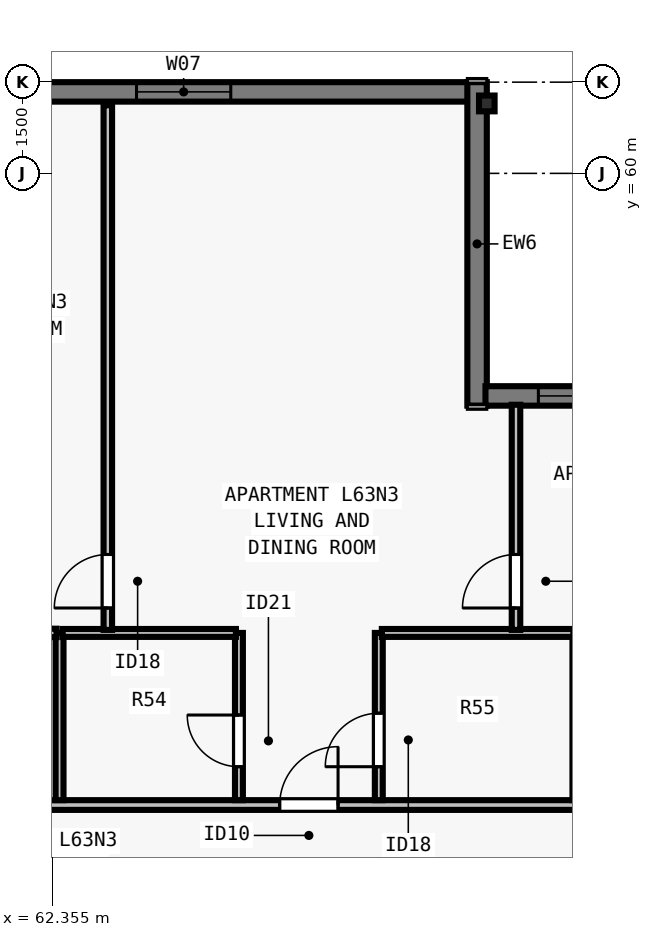
"""IFC4 building model, lengths in metres.
Left out: names, types, materials, properties, quantities, classifications, styles, units other than length and angle.
Written with IfcOpenShell. Run it as: python <this file> out.ifc"""

import sys

from ifc_helpers import new_model, si_unit, direction, frame, frame_2d, origin, origin_2d, place, context, subcontext, project, spatial, rectangle, i_section, extrude, element, fill, save


model = new_model("IFC4")
c1 = context("Model", 3, precision=1e-05, world=origin(), true_north=direction((0.0, 1.0)))
c2 = subcontext(c1, "Body", "Model", "MODEL_VIEW")
j1 = project(units=[si_unit("LENGTHUNIT", "METRE"), si_unit("PLANEANGLEUNIT", "RADIAN")], contexts=[c1])
p1 = place(None, origin())
s1 = spatial("IfcSite", under=j1, at=p1, CompositionType="ELEMENT")
p2 = place(p1, origin())
s2 = spatial("IfcBuilding", under=s1, at=p2, CompositionType="ELEMENT")
p3 = place(p2, frame((0.0, 0.0, 230.5)))
s3 = spatial("IfcBuildingStorey", under=s2, at=p3, CompositionType="ELEMENT", Elevation=230.5)
p4 = place(p3, frame((69.5, 61.15, 0.0), z_axis=(0.0, 0.0, 1.0), x_axis=(1.0, 0.0, 0.0)))
e1 = element("IfcColumn", 1, at=p4, inside=s3, PredefinedType="COLUMN", context=c2, shape_type="SweptSolid", body=[
    extrude(i_section(OverallWidth=0.256, OverallDepth=0.26, WebThickness=0.01, FlangeThickness=0.017, FilletRadius=0.013, at=origin_2d()), origin(), (0.0, 0.0, 1.0), 3.5),
])
p5 = place(p3, frame((34.5, 61.34, 0.0), z_axis=(0.0, 0.0, 1.0), x_axis=(1.0, 0.0, 0.0)))
e2 = element("IfcWall", 2, at=p5, inside=s3, PredefinedType="SOLIDWALL", context=c2, shape_type="SweptSolid", body=[
    extrude(rectangle(XDim=34.702, YDim=0.32, at=frame_2d((17.351, 0.0))), origin(), (0.0, 0.0, 1.0), 3.29),
])
p6 = place(p5, frame((4.163, 0.0, 0.8)))
e3 = element("IfcOpeningElement", 3, at=p6, cuts=e2, PredefinedType="OPENING", context=c2, shape_type="SweptSolid", body=[
    extrude(rectangle(XDim=1.85, YDim=1.678, at=frame_2d((0.925, 0.839))), frame((0.0, 0.17, 0.0), z_axis=(0.0, -1.0, 0.0), x_axis=(1.0, 0.0, 0.0)), (0.0, 0.0, 1.0), 0.34),
])
p7 = place(p5, frame((8.138, 0.0, 0.8)))
e4 = element("IfcOpeningElement", 4, at=p7, cuts=e2, PredefinedType="OPENING", context=c2, shape_type="SweptSolid", body=[
    extrude(rectangle(XDim=1.55, YDim=1.678, at=frame_2d((0.775, 0.839))), frame((0.0, 0.17, 0.0), z_axis=(0.0, -1.0, 0.0), x_axis=(1.0, 0.0, 0.0)), (0.0, 0.0, 1.0), 0.34),
])
p8 = place(p5, frame((15.338, 0.0, 0.8)))
e5 = element("IfcOpeningElement", 5, at=p8, cuts=e2, PredefinedType="OPENING", context=c2, shape_type="SweptSolid", body=[
    extrude(rectangle(XDim=1.55, YDim=1.678, at=frame_2d((0.775, 0.839))), frame((0.0, 0.17, 0.0), z_axis=(0.0, -1.0, 0.0), x_axis=(1.0, 0.0, 0.0)), (0.0, 0.0, 1.0), 0.34),
])
p9 = place(p5, frame((18.114, 0.0, 0.8)))
e6 = element("IfcOpeningElement", 6, at=p9, cuts=e2, PredefinedType="OPENING", context=c2, shape_type="SweptSolid", body=[
    extrude(rectangle(XDim=1.85, YDim=1.678, at=frame_2d((0.925, 0.839))), frame((0.0, 0.17, 0.0), z_axis=(0.0, -1.0, 0.0), x_axis=(1.0, 0.0, 0.0)), (0.0, 0.0, 1.0), 0.34),
])
p10 = place(p5, frame((25.314, 0.0, 0.8)))
e7 = element("IfcOpeningElement", 7, at=p10, cuts=e2, PredefinedType="OPENING", context=c2, shape_type="SweptSolid", body=[
    extrude(rectangle(XDim=1.85, YDim=1.678, at=frame_2d((0.925, 0.839))), frame((0.0, 0.17, 0.0), z_axis=(0.0, -1.0, 0.0), x_axis=(1.0, 0.0, 0.0)), (0.0, 0.0, 1.0), 0.34),
])
p11 = place(p5, frame((29.24, 0.0, 0.8)))
e8 = element("IfcOpeningElement", 8, at=p11, cuts=e2, PredefinedType="OPENING", context=c2, shape_type="SweptSolid", body=[
    extrude(rectangle(XDim=1.55, YDim=1.678, at=frame_2d((0.775, 0.839))), frame((0.0, 0.17, 0.0), z_axis=(0.0, -1.0, 0.0), x_axis=(1.0, 0.0, 0.0)), (0.0, 0.0, 1.0), 0.34),
])
p12 = place(p5, frame((10.95, 0.0, 0.8)))
e9 = element("IfcOpeningElement", 9, at=p12, cuts=e2, PredefinedType="OPENING", context=c2, shape_type="SweptSolid", body=[
    extrude(rectangle(XDim=0.9, YDim=1.678, at=frame_2d((0.45, 0.839))), frame((0.0, 0.17, 0.0), z_axis=(0.0, -1.0, 0.0), x_axis=(1.0, 0.0, 0.0)), (0.0, 0.0, 1.0), 0.34),
])
p13 = place(p5, frame((22.87, 0.0, 0.8)))
e10 = element("IfcOpeningElement", 10, at=p13, cuts=e2, PredefinedType="OPENING", context=c2, shape_type="SweptSolid", body=[
    extrude(rectangle(XDim=0.9, YDim=1.678, at=frame_2d((0.45, 0.839))), frame((0.0, 0.17, 0.0), z_axis=(0.0, -1.0, 0.0), x_axis=(1.0, 0.0, 0.0)), (0.0, 0.0, 1.0), 0.34),
])
p14 = place(p3, frame((69.34, 61.5, 0.0), z_axis=(0.0, 0.0, 1.0), x_axis=(0.0, -1.0, 0.0)))
e11 = element("IfcWall", 11, at=p14, inside=s3, PredefinedType="SOLIDWALL", context=c2, shape_type="SweptSolid", body=[
    extrude(rectangle(XDim=5.32, YDim=0.32, at=frame_2d((2.66, 0.0))), origin(), (0.0, 0.0, 1.0), 3.29),
])
p15 = place(p3, frame((69.478, 56.34, 0.0), z_axis=(0.0, 0.0, 1.0), x_axis=(1.0, 0.0, 0.0)))
e12 = element("IfcWall", 12, at=p15, inside=s3, PredefinedType="SOLIDWALL", context=c2, shape_type="SweptSolid", body=[
    extrude(rectangle(XDim=4.724, YDim=0.32, at=frame_2d((2.362, 0.0))), origin(), (0.0, 0.0, 1.0), 3.29),
])
p16 = place(p15, frame((0.87, 0.0, 0.8)))
e13 = element("IfcOpeningElement", 13, at=p16, cuts=e12, PredefinedType="OPENING", context=c2, shape_type="SweptSolid", body=[
    extrude(rectangle(XDim=0.9, YDim=1.678, at=frame_2d((0.45, 0.839))), frame((0.0, 0.17, 0.0), z_axis=(0.0, -1.0, 0.0), x_axis=(1.0, 0.0, 0.0)), (0.0, 0.0, 1.0), 0.34),
])
p17 = place(p3, frame((29.77, 49.613, 0.0), z_axis=(0.0, 0.0, 1.0), x_axis=(1.0, 0.0, 0.0)))
e14 = element("IfcWall", 14, at=p17, inside=s3, PredefinedType="PARTITIONING", context=c2, shape_type="SweptSolid", body=[
    extrude(rectangle(XDim=44.425, YDim=0.16, at=frame_2d((22.212, 0.0))), origin(), (0.0, 0.0, 1.0), 2.958),
])
p18 = place(p17, frame((7.241, 0.0, 0.0)))
e15 = element("IfcOpeningElement", 15, at=p18, cuts=e14, PredefinedType="OPENING", context=c2, shape_type="SweptSolid", body=[
    extrude(rectangle(XDim=0.96, YDim=2.18, at=frame_2d((0.48, 1.09))), frame((0.0, 0.09, 0.0), z_axis=(0.0, -1.0, 0.0), x_axis=(1.0, 0.0, 0.0)), (0.0, 0.0, 1.0), 0.18),
])
p19 = place(p17, frame((21.815, 0.0, 0.0)))
e16 = element("IfcOpeningElement", 16, at=p19, cuts=e14, PredefinedType="OPENING", context=c2, shape_type="SweptSolid", body=[
    extrude(rectangle(XDim=0.96, YDim=2.18, at=frame_2d((0.48, 1.09))), frame((0.0, 0.09, 0.0), z_axis=(0.0, -1.0, 0.0), x_axis=(1.0, 0.0, 0.0)), (0.0, 0.0, 1.0), 0.18),
])
p20 = place(p17, frame((36.324, 0.0, 0.0)))
e17 = element("IfcOpeningElement", 17, at=p20, cuts=e14, PredefinedType="OPENING", context=c2, shape_type="SweptSolid", body=[
    extrude(rectangle(XDim=0.96, YDim=2.18, at=frame_2d((0.48, 1.09))), frame((0.0, 0.09, 0.0), z_axis=(0.0, -1.0, 0.0), x_axis=(1.0, 0.0, 0.0)), (0.0, 0.0, 1.0), 0.18),
])
p21 = place(p3, frame((62.474, 49.692, 0.0), z_axis=(0.0, 0.0, 1.0), x_axis=(0.0, 1.0, 0.0)))
e18 = element("IfcWall", 18, at=p21, inside=s3, PredefinedType="PLUMBINGWALL", context=c2, shape_type="SweptSolid", body=[
    extrude(rectangle(XDim=2.75, YDim=0.13, at=frame_2d((1.375, 0.0))), origin(), (0.0, 0.0, 1.0), 2.573),
])
p22 = place(p3, frame((65.424, 49.692, 0.0), z_axis=(0.0, 0.0, 1.0), x_axis=(0.0, 1.0, 0.0)))
e19 = element("IfcWall", 19, at=p22, inside=s3, PredefinedType="PLUMBINGWALL", context=c2, shape_type="SweptSolid", body=[
    extrude(rectangle(XDim=2.75, YDim=0.13, at=frame_2d((1.375, 0.0))), origin(), (0.0, 0.0, 1.0), 3.29),
])
p23 = place(p22, frame((0.55, 0.0, 0.0)))
e20 = element("IfcOpeningElement", 20, at=p23, cuts=e19, PredefinedType="OPENING", context=c2, shape_type="SweptSolid", body=[
    extrude(rectangle(XDim=0.85, YDim=2.08, at=frame_2d((0.425, 1.04))), frame((0.0, 0.075, 0.0), z_axis=(0.0, -1.0, 0.0), x_axis=(1.0, 0.0, 0.0)), (0.0, 0.0, 1.0), 0.15),
])
p24 = place(p3, frame((62.524, 52.442, 0.0), z_axis=(0.0, 0.0, 1.0), x_axis=(1.0, 0.0, 0.0)))
e21 = element("IfcWall", 21, at=p24, inside=s3, PredefinedType="PLUMBINGWALL", context=c2, shape_type="SweptSolid", body=[
    extrude(rectangle(XDim=2.85, YDim=0.13, at=frame_2d((1.425, 0.0))), origin(), (0.0, 0.0, 1.0), 3.29),
])
p25 = place(p3, frame((67.724, 49.692, 0.0), z_axis=(0.0, 0.0, 1.0), x_axis=(0.0, 1.0, 0.0)))
e22 = element("IfcWall", 22, at=p25, inside=s3, PredefinedType="PLUMBINGWALL", context=c2, shape_type="SweptSolid", body=[
    extrude(rectangle(XDim=2.75, YDim=0.13, at=frame_2d((1.375, 0.0))), origin(), (0.0, 0.0, 1.0), 3.29),
])
p26 = place(p25, frame((0.55, 0.0, 0.0)))
e23 = element("IfcOpeningElement", 23, at=p26, cuts=e22, PredefinedType="OPENING", context=c2, shape_type="SweptSolid", body=[
    extrude(rectangle(XDim=0.88, YDim=2.1, at=frame_2d((0.44, 1.05))), frame((0.0, 0.075, 0.0), z_axis=(0.0, -1.0, 0.0), x_axis=(1.0, 0.0, 0.0)), (0.0, 0.0, 1.0), 0.15),
])
p27 = place(p3, frame((67.774, 52.442, 0.0), z_axis=(0.0, 0.0, 1.0), x_axis=(1.0, 0.0, 0.0)))
e24 = element("IfcWall", 24, at=p27, inside=s3, PredefinedType="PLUMBINGWALL", context=c2, shape_type="SweptSolid", body=[
    extrude(rectangle(XDim=3.15, YDim=0.13, at=frame_2d((1.575, 0.0))), origin(), (0.0, 0.0, 1.0), 2.958),
])
p28 = place(p3, frame((63.268, 52.492, 0.0), z_axis=(0.0, 0.0, 1.0), x_axis=(0.0, 1.0, 0.0)))
e25 = element("IfcWall", 25, at=p28, inside=s3, PredefinedType="PARTITIONING", context=c2, shape_type="SweptSolid", body=[
    extrude(rectangle(XDim=8.628, YDim=0.14, at=frame_2d((4.314, 0.0))), origin(), (0.0, 0.0, 1.0), 3.29),
])
p29 = place(p28, frame((0.36, 0.0, 0.0)))
e26 = element("IfcOpeningElement", 26, at=p29, cuts=e25, PredefinedType="OPENING", context=c2, shape_type="SweptSolid", body=[
    extrude(rectangle(XDim=0.88, YDim=2.1, at=frame_2d((0.44, 1.05))), frame((0.0, 0.08, 0.0), z_axis=(0.0, -1.0, 0.0), x_axis=(1.0, 0.0, 0.0)), (0.0, 0.0, 1.0), 0.16),
])
p30 = place(p3, frame((59.133, 52.442, 0.0), z_axis=(0.0, 0.0, 1.0), x_axis=(1.0, 0.0, 0.0)))
e27 = element("IfcWall", 27, at=p30, inside=s3, PredefinedType="PARTITIONING", context=c2, shape_type="SweptSolid", body=[
    extrude(rectangle(XDim=3.291, YDim=0.14, at=frame_2d((1.646, 0.0))), origin(), (0.0, 0.0, 1.0), 3.29),
])
p31 = place(p30, frame((0.335, 0.0, 0.0)))
e28 = element("IfcOpeningElement", 28, at=p31, cuts=e27, PredefinedType="OPENING", context=c2, shape_type="SweptSolid", body=[
    extrude(rectangle(XDim=0.82, YDim=2.1, at=frame_2d((0.41, 1.05))), frame((0.0, 0.08, 0.0), z_axis=(0.0, -1.0, 0.0), x_axis=(1.0, 0.0, 0.0)), (0.0, 0.0, 1.0), 0.16),
])
p32 = place(p3, frame((69.98, 52.492, 0.0), z_axis=(0.0, 0.0, 1.0), x_axis=(0.0, 1.0, 0.0)))
e29 = element("IfcWall", 29, at=p32, inside=s3, PredefinedType="PARTITIONING", context=c2, shape_type="SweptSolid", body=[
    extrude(rectangle(XDim=3.703, YDim=0.14, at=frame_2d((1.851, 0.0))), origin(), (0.0, 0.0, 1.0), 3.29),
])
p33 = place(p32, frame((0.36, 0.0, 0.0)))
e30 = element("IfcOpeningElement", 30, at=p33, cuts=e29, PredefinedType="OPENING", context=c2, shape_type="SweptSolid", body=[
    extrude(rectangle(XDim=0.88, YDim=2.1, at=frame_2d((0.44, 1.05))), frame((0.0, 0.08, 0.0), z_axis=(0.0, -1.0, 0.0), x_axis=(1.0, 0.0, 0.0)), (0.0, 0.0, 1.0), 0.16),
])
p34 = place(p11, origin())
e31 = element("IfcWindow", 31, at=p34, inside=s3, PartitioningType="SINGLE_PANEL", PredefinedType="WINDOW", context=c2, shape_type="SweptSolid", body=[
    extrude(rectangle(XDim=1.55, YDim=1.678, at=frame_2d((0.775, 0.839))), frame((0.0, -0.05, 0.0), z_axis=(0.0, -1.0, 0.0), x_axis=(1.0, 0.0, 0.0)), (0.0, 0.0, 1.0), 0.06),
])
fill(e8, e31)
p35 = place(p16, origin())
e32 = element("IfcWindow", 32, at=p35, inside=s3, PartitioningType="SINGLE_PANEL", PredefinedType="WINDOW", context=c2, shape_type="SweptSolid", body=[
    extrude(rectangle(XDim=0.9, YDim=1.678, at=frame_2d((0.45, 0.839))), frame((0.0, -0.04, 0.0), z_axis=(0.0, -1.0, 0.0), x_axis=(1.0, 0.0, 0.0)), (0.0, 0.0, 1.0), 0.06),
])
fill(e13, e32)
p36 = place(p23, origin())
e33 = element("IfcDoor", 33, at=p36, inside=s3, OperationType="SINGLE_SWING_RIGHT", PredefinedType="DOOR", context=c2, shape_type="SweptSolid", body=[
    extrude(rectangle(XDim=0.85, YDim=2.08, at=frame_2d((0.425, 1.04))), frame((0.0, 0.025, 0.0), z_axis=(0.0, -1.0, 0.0), x_axis=(1.0, 0.0, 0.0)), (0.0, 0.0, 1.0), 0.05),
])
fill(e20, e33)
p37 = place(p26, origin())
e34 = element("IfcDoor", 34, at=p37, inside=s3, OperationType="SINGLE_SWING_LEFT", PredefinedType="DOOR", context=c2, shape_type="SweptSolid", body=[
    extrude(rectangle(XDim=0.88, YDim=2.1, at=frame_2d((0.44, 1.05))), frame((0.0, 0.025, 0.0), z_axis=(0.0, -1.0, 0.0), x_axis=(1.0, 0.0, 0.0)), (0.0, 0.0, 1.0), 0.05),
])
fill(e23, e34)
p38 = place(p29, origin())
e35 = element("IfcDoor", 35, at=p38, inside=s3, OperationType="SINGLE_SWING_LEFT", PredefinedType="DOOR", context=c2, shape_type="SweptSolid", body=[
    extrude(rectangle(XDim=0.88, YDim=2.1, at=frame_2d((0.44, 1.05))), frame((0.0, 0.025, 0.0), z_axis=(0.0, -1.0, 0.0), x_axis=(1.0, 0.0, 0.0)), (0.0, 0.0, 1.0), 0.05),
])
fill(e26, e35)
p39 = place(p33, origin())
e36 = element("IfcDoor", 36, at=p39, inside=s3, OperationType="SINGLE_SWING_LEFT", PredefinedType="DOOR", context=c2, shape_type="SweptSolid", body=[
    extrude(rectangle(XDim=0.88, YDim=2.1, at=frame_2d((0.44, 1.05))), frame((0.0, 0.025, 0.0), z_axis=(0.0, -1.0, 0.0), x_axis=(1.0, 0.0, 0.0)), (0.0, 0.0, 1.0), 0.05),
])
fill(e30, e36)
p40 = place(p20, origin())
e37 = element("IfcDoor", 37, at=p40, inside=s3, OperationType="SINGLE_SWING_RIGHT", PredefinedType="DOOR", context=c2, shape_type="SweptSolid", body=[
    extrude(rectangle(XDim=0.96, YDim=2.18, at=frame_2d((0.48, 1.09))), frame((0.0, 0.025, 0.0), z_axis=(0.0, -1.0, 0.0), x_axis=(1.0, 0.0, 0.0)), (0.0, 0.0, 1.0), 0.05),
])
fill(e17, e37)
save(model, sys.argv[1])
